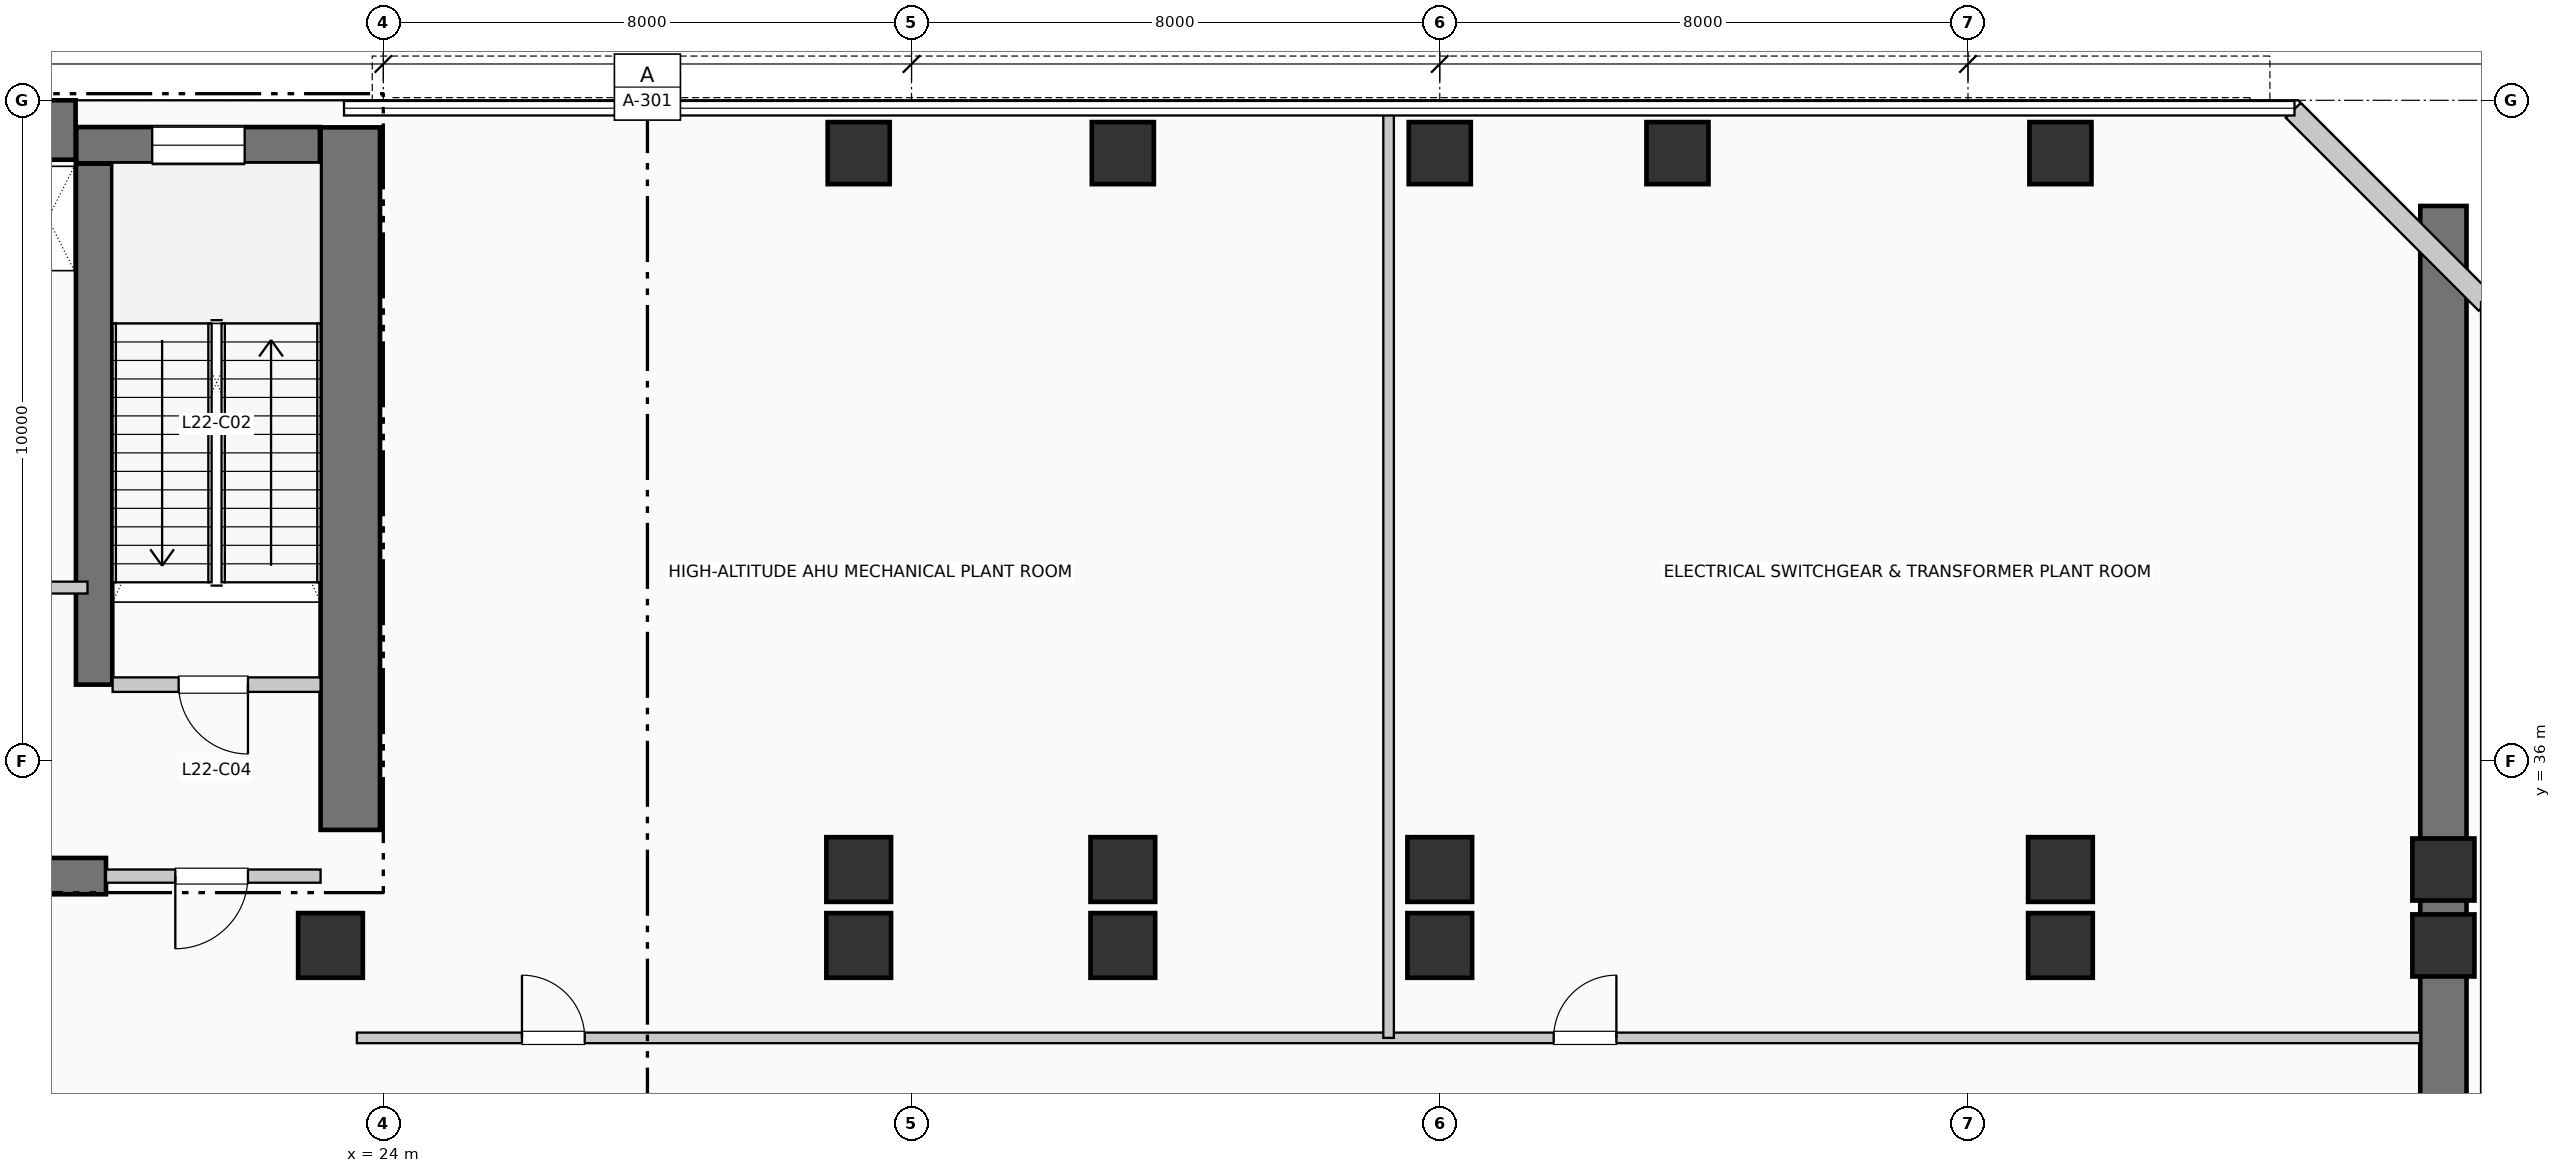
"""IFC4 building model, lengths in metres.
Left out: names, types, materials, properties, quantities, classifications, styles, units other than length and angle.
Written with IfcOpenShell. Run it as: python <this file> out.ifc"""

import sys

from ifc_helpers import new_model, si_unit, direction, frame, frame_2d, origin, origin_2d, place, context, subcontext, project, spatial, rectangle, extrude, element, fill, save


model = new_model("IFC4")
c1 = context("Model", 3, precision=1e-05, world=origin(), true_north=direction((0.0, 1.0)))
c2 = subcontext(c1, "Body", "Model", "MODEL_VIEW")
j1 = project(units=[si_unit("LENGTHUNIT", "METRE"), si_unit("PLANEANGLEUNIT", "RADIAN")], contexts=[c1])
p1 = place(None, origin())
s1 = spatial("IfcSite", under=j1, at=p1, CompositionType="ELEMENT")
p2 = place(p1, origin())
s2 = spatial("IfcBuilding", under=s1, at=p2, CompositionType="ELEMENT")
p3 = place(p2, frame((0.0, 0.0, 93.72)))
s3 = spatial("IfcBuildingStorey", under=s2, at=p3, CompositionType="ELEMENT", Elevation=93.72)
p4 = place(p3, frame((5.36, 45.55, 0.0), z_axis=(0.0, 0.0, 1.0), x_axis=(1.0, 0.0, 0.0)))
e1 = element("IfcWall", 1, at=p4, inside=s3, PredefinedType="SHEAR", context=c2, shape_type="SweptSolid", body=[
    extrude(rectangle(XDim=13.98, YDim=0.9, at=frame_2d((6.99, 0.0))), origin(), (0.0, 0.0, 1.0), 4.95),
])
p5 = place(p3, frame((23.5, 34.95, 0.0), z_axis=(0.0, 0.0, 1.0), x_axis=(0.0, 1.0, 0.0)))
e2 = element("IfcWall", 2, at=p5, inside=s3, PredefinedType="SHEAR", context=c2, shape_type="SweptSolid", body=[
    extrude(rectangle(XDim=10.64, YDim=0.9, at=frame_2d((5.32, 0.0))), origin(), (0.0, 0.0, 1.0), 4.95),
])
p6 = place(p3, frame((13.68, 34.25, 0.0), z_axis=(0.0, 0.0, 1.0), x_axis=(1.0, 0.0, 0.0)))
e3 = element("IfcWall", 3, at=p6, inside=s3, PredefinedType="SHEAR", context=c2, shape_type="SweptSolid", body=[
    extrude(rectangle(XDim=6.12, YDim=0.55, at=frame_2d((3.06, 0.0))), origin(), (0.0, 0.0, 1.0), 4.95),
])
p7 = place(p3, frame((19.62, 37.15, 0.0), z_axis=(0.0, 0.0, 1.0), x_axis=(0.0, 1.0, 0.0)))
e4 = element("IfcWall", 4, at=p7, inside=s3, PredefinedType="SHEAR", context=c2, shape_type="SweptSolid", body=[
    extrude(rectangle(XDim=7.89, YDim=0.55, at=frame_2d((3.945, 0.0))), origin(), (0.0, 0.0, 1.0), 4.95),
])
p8 = place(p3, frame((19.35, 45.32, 0.0), z_axis=(0.0, 0.0, 1.0), x_axis=(1.0, 0.0, 0.0)))
e5 = element("IfcWall", 5, at=p8, inside=s3, PredefinedType="SHEAR", context=c2, shape_type="SweptSolid", body=[
    extrude(rectangle(XDim=3.69, YDim=0.55, at=frame_2d((1.845, 0.0))), origin(), (0.0, 0.0, 1.0), 4.95),
])
p9 = place(p8, frame((1.15, 0.0, 1.05)))
e6 = element("IfcOpeningElement", 6, at=p9, cuts=e5, PredefinedType="OPENING", context=c2, shape_type="SweptSolid", body=[
    extrude(rectangle(XDim=1.4, YDim=1.8, at=frame_2d((0.7, 0.9))), frame((0.0, 0.285, 0.0), z_axis=(0.0, -1.0, 0.0), x_axis=(1.0, 0.0, 0.0)), (0.0, 0.0, 1.0), 0.57),
])
p10 = place(p3, frame((55.2, 19.5, 0.0), z_axis=(0.0, 0.0, 1.0), x_axis=(0.0, 1.0, 0.0)))
e7 = element("IfcWall", 7, at=p10, inside=s3, PredefinedType="SHEAR", context=c2, shape_type="SweptSolid", body=[
    extrude(rectangle(XDim=24.9, YDim=0.7, at=frame_2d((12.45, 0.0))), origin(), (0.0, 0.0, 1.0), 4.3),
])
for number, where, z_axis, x_axis in (
    (8, (23.2, 33.2, 0.0), (0.0, 0.0, 1.0), (1.0, 0.0, 0.0)),
    (9, (31.2, 33.2, 0.0), (0.0, 0.0, 1.0), (1.0, 0.0, 0.0)),
    (10, (31.2, 34.35, 0.0), (0.0, 0.0, 1.0), (1.0, 0.0, 0.0)),
):
    element("IfcColumn", number, at=place(p3, frame(where, z_axis=z_axis, x_axis=x_axis)), inside=s3, PredefinedType="COLUMN", context=c2, shape_type="SweptSolid", body=[
        extrude(rectangle(XDim=0.98, YDim=0.98, at=origin_2d()), origin(), (0.0, 0.0, 1.0), 4.95),
    ])
p11 = place(p3, frame((31.2, 45.2, 0.0), z_axis=(0.0, 0.0, 1.0), x_axis=(1.0, 0.0, 0.0)))
e11 = element("IfcColumn", 11, at=p11, inside=s3, PredefinedType="COLUMN", context=c2, shape_type="SweptSolid", body=[
    extrude(rectangle(XDim=0.94, YDim=0.94, at=origin_2d()), origin(), (0.0, 0.0, 1.0), 4.95),
])
for number, where, z_axis, x_axis in (
    (12, (35.2, 33.2, 0.0), (0.0, 0.0, 1.0), (1.0, 0.0, 0.0)),
    (13, (35.2, 34.35, 0.0), (0.0, 0.0, 1.0), (1.0, 0.0, 0.0)),
):
    element("IfcColumn", number, at=place(p3, frame(where, z_axis=z_axis, x_axis=x_axis)), inside=s3, PredefinedType="COLUMN", context=c2, shape_type="SweptSolid", body=[
        extrude(rectangle(XDim=0.98, YDim=0.98, at=origin_2d()), origin(), (0.0, 0.0, 1.0), 4.95),
    ])
p12 = place(p3, frame((35.2, 45.2, 0.0), z_axis=(0.0, 0.0, 1.0), x_axis=(1.0, 0.0, 0.0)))
e14 = element("IfcColumn", 14, at=p12, inside=s3, PredefinedType="COLUMN", context=c2, shape_type="SweptSolid", body=[
    extrude(rectangle(XDim=0.94, YDim=0.94, at=origin_2d()), origin(), (0.0, 0.0, 1.0), 4.95),
])
for number, where, z_axis, x_axis in (
    (15, (40.0, 33.2, 0.0), (0.0, 0.0, 1.0), (1.0, 0.0, 0.0)),
    (16, (40.0, 34.35, 0.0), (0.0, 0.0, 1.0), (1.0, 0.0, 0.0)),
):
    element("IfcColumn", number, at=place(p3, frame(where, z_axis=z_axis, x_axis=x_axis)), inside=s3, PredefinedType="COLUMN", context=c2, shape_type="SweptSolid", body=[
        extrude(rectangle(XDim=0.98, YDim=0.98, at=origin_2d()), origin(), (0.0, 0.0, 1.0), 4.95),
    ])
for number, where, z_axis, x_axis in (
    (17, (40.0, 45.2, 0.0), (0.0, 0.0, 1.0), (1.0, 0.0, 0.0)),
    (18, (43.6, 45.2, 0.0), (0.0, 0.0, 1.0), (1.0, 0.0, 0.0)),
):
    element("IfcColumn", number, at=place(p3, frame(where, z_axis=z_axis, x_axis=x_axis)), inside=s3, PredefinedType="COLUMN", context=c2, shape_type="SweptSolid", body=[
        extrude(rectangle(XDim=0.94, YDim=0.94, at=origin_2d()), origin(), (0.0, 0.0, 1.0), 4.95),
    ])
for number, where, z_axis, x_axis in (
    (19, (49.4, 33.2, 0.0), (0.0, 0.0, 1.0), (1.0, 0.0, 0.0)),
    (20, (49.4, 34.35, 0.0), (0.0, 0.0, 1.0), (1.0, 0.0, 0.0)),
):
    element("IfcColumn", number, at=place(p3, frame(where, z_axis=z_axis, x_axis=x_axis)), inside=s3, PredefinedType="COLUMN", context=c2, shape_type="SweptSolid", body=[
        extrude(rectangle(XDim=0.98, YDim=0.98, at=origin_2d()), origin(), (0.0, 0.0, 1.0), 4.95),
    ])
for number, where, z_axis, x_axis in (
    (21, (49.4, 45.2, 0.0), (0.0, 0.0, 1.0), (1.0, 0.0, 0.0)),
    (22, (55.2, 33.2, 0.0), (0.0, 0.0, 1.0), (1.0, 0.0, 0.0)),
    (23, (55.2, 34.35, 0.0), (0.0, 0.0, 1.0), (1.0, 0.0, 0.0)),
):
    element("IfcColumn", number, at=place(p3, frame(where, z_axis=z_axis, x_axis=x_axis)), inside=s3, PredefinedType="COLUMN", context=c2, shape_type="SweptSolid", body=[
        extrude(rectangle(XDim=0.94, YDim=0.94, at=origin_2d()), origin(), (0.0, 0.0, 1.0), 4.95),
    ])
p13 = place(p3, frame((55.848, 42.926, 0.0), z_axis=(0.0, 0.0, 1.0), x_axis=(-0.707106781187, 0.707106781187, 0.0)))
e24 = element("IfcWall", 24, at=p13, inside=s3, PredefinedType="SOLIDWALL", context=c2, shape_type="SweptSolid", body=[
    extrude(rectangle(XDim=4.133, YDim=0.32, at=frame_2d((2.066, 0.0))), origin(), (0.0, 0.0, 1.0), 4.7),
])
p14 = place(p3, frame((19.9, 37.15, 0.0), z_axis=(0.0, 0.0, 1.0), x_axis=(1.0, 0.0, 0.0)))
e25 = element("IfcWall", 25, at=p14, inside=s3, PredefinedType="PARTITIONING", context=c2, shape_type="SweptSolid", body=[
    extrude(rectangle(XDim=3.15, YDim=0.22, at=frame_2d((1.575, 0.0))), origin(), (0.0, 0.0, 1.0), 4.7),
])
p15 = place(p14, frame((2.05, 0.0, 0.0), z_axis=(0.0, 0.0, 1.0), x_axis=(-1.0, 0.0, 0.0)))
e26 = element("IfcOpeningElement", 26, at=p15, cuts=e25, PredefinedType="OPENING", context=c2, shape_type="SweptSolid", body=[
    extrude(rectangle(XDim=1.05, YDim=2.15, at=frame_2d((0.525, 1.075))), frame((0.0, 0.12, 0.0), z_axis=(0.0, -1.0, 0.0), x_axis=(1.0, 0.0, 0.0)), (0.0, 0.0, 1.0), 0.24),
])
p16 = place(p3, frame((19.8, 34.25, 0.0), z_axis=(0.0, 0.0, 1.0), x_axis=(1.0, 0.0, 0.0)))
e27 = element("IfcWall", 27, at=p16, inside=s3, PredefinedType="PARTITIONING", context=c2, shape_type="SweptSolid", body=[
    extrude(rectangle(XDim=3.25, YDim=0.2, at=frame_2d((1.625, 0.0))), origin(), (0.0, 0.0, 1.0), 4.7),
])
p17 = place(p16, frame((2.15, 0.0, 0.0), z_axis=(0.0, 0.0, 1.0), x_axis=(-1.0, 0.0, 0.0)))
e28 = element("IfcOpeningElement", 28, at=p17, cuts=e27, PredefinedType="OPENING", context=c2, shape_type="SweptSolid", body=[
    extrude(rectangle(XDim=1.1, YDim=2.15, at=frame_2d((0.55, 1.075))), frame((0.0, 0.11, 0.0), z_axis=(0.0, -1.0, 0.0), x_axis=(1.0, 0.0, 0.0)), (0.0, 0.0, 1.0), 0.22),
])
p18 = place(p3, frame((17.68, 38.62, 0.0), z_axis=(0.0, 0.0, 1.0), x_axis=(1.0, 0.0, 0.0)))
e29 = element("IfcWall", 29, at=p18, inside=s3, PredefinedType="PARTITIONING", context=c2, shape_type="SweptSolid", body=[
    extrude(rectangle(XDim=1.84, YDim=0.18, at=frame_2d((0.92, 0.0))), origin(), (0.0, 0.0, 1.0), 4.7),
])
p19 = place(p18, frame((0.24, 0.0, 0.0)))
e30 = element("IfcOpeningElement", 30, at=p19, cuts=e29, PredefinedType="OPENING", context=c2, shape_type="SweptSolid", body=[
    extrude(rectangle(XDim=0.92, YDim=2.1, at=frame_2d((0.46, 1.05))), frame((0.0, 0.1, 0.0), z_axis=(0.0, -1.0, 0.0), x_axis=(1.0, 0.0, 0.0)), (0.0, 0.0, 1.0), 0.2),
])
p20 = place(p3, frame((23.6, 31.8, 0.0), z_axis=(0.0, 0.0, 1.0), x_axis=(1.0, 0.0, 0.0)))
e31 = element("IfcWall", 31, at=p20, inside=s3, PredefinedType="PARTITIONING", context=c2, shape_type="SweptSolid", body=[
    extrude(rectangle(XDim=31.25, YDim=0.16, at=frame_2d((15.625, 0.0))), origin(), (0.0, 0.0, 1.0), 4.7),
])
p21 = place(p20, frame((2.5, 0.0, 0.0)))
e32 = element("IfcOpeningElement", 32, at=p21, cuts=e31, PredefinedType="OPENING", context=c2, shape_type="SweptSolid", body=[
    extrude(rectangle(XDim=0.95, YDim=2.1, at=frame_2d((0.475, 1.05))), frame((0.0, 0.09, 0.0), z_axis=(0.0, -1.0, 0.0), x_axis=(1.0, 0.0, 0.0)), (0.0, 0.0, 1.0), 0.18),
])
p22 = place(p20, frame((18.125, 0.0, 0.0)))
e33 = element("IfcOpeningElement", 33, at=p22, cuts=e31, PredefinedType="OPENING", context=c2, shape_type="SweptSolid", body=[
    extrude(rectangle(XDim=0.95, YDim=2.1, at=frame_2d((0.475, 1.05))), frame((0.0, 0.09, 0.0), z_axis=(0.0, -1.0, 0.0), x_axis=(1.0, 0.0, 0.0)), (0.0, 0.0, 1.0), 0.18),
])
p23 = place(p3, frame((39.225, 31.8, 0.0), z_axis=(0.0, 0.0, 1.0), x_axis=(0.0, 1.0, 0.0)))
e34 = element("IfcWall", 34, at=p23, inside=s3, PredefinedType="PARTITIONING", context=c2, shape_type="SweptSolid", body=[
    extrude(rectangle(XDim=14.01, YDim=0.16, at=frame_2d((7.005, 0.0))), origin(), (0.0, 0.0, 1.0), 4.7),
])
p24 = place(p9, origin())
e35 = element("IfcWindow", 35, at=p24, inside=s3, PartitioningType="SINGLE_PANEL", PredefinedType="WINDOW", context=c2, shape_type="SweptSolid", body=[
    extrude(rectangle(XDim=1.4, YDim=1.8, at=frame_2d((0.7, 0.9))), frame((0.0, 0.03, 0.0), z_axis=(0.0, -1.0, 0.0), x_axis=(1.0, 0.0, 0.0)), (0.0, 0.0, 1.0), 0.06),
])
fill(e6, e35)
p25 = place(p15, origin())
e36 = element("IfcDoor", 36, at=p25, inside=s3, OperationType="SINGLE_SWING_RIGHT", PredefinedType="DOOR", context=c2, shape_type="SweptSolid", body=[
    extrude(rectangle(XDim=1.05, YDim=2.15, at=frame_2d((0.525, 1.075))), frame((0.0, 0.025, 0.0), z_axis=(0.0, -1.0, 0.0), x_axis=(1.0, 0.0, 0.0)), (0.0, 0.0, 1.0), 0.05),
])
fill(e26, e36)
p26 = place(p17, origin())
e37 = element("IfcDoor", 37, at=p26, inside=s3, OperationType="SINGLE_SWING_LEFT", PredefinedType="DOOR", context=c2, shape_type="SweptSolid", body=[
    extrude(rectangle(XDim=1.1, YDim=2.15, at=frame_2d((0.55, 1.075))), frame((0.0, 0.025, 0.0), z_axis=(0.0, -1.0, 0.0), x_axis=(1.0, 0.0, 0.0)), (0.0, 0.0, 1.0), 0.05),
])
fill(e28, e37)
p27 = place(p21, origin())
e38 = element("IfcDoor", 38, at=p27, inside=s3, OperationType="SINGLE_SWING_LEFT", PredefinedType="DOOR", context=c2, shape_type="SweptSolid", body=[
    extrude(rectangle(XDim=0.95, YDim=2.1, at=frame_2d((0.475, 1.05))), frame((0.0, 0.025, 0.0), z_axis=(0.0, -1.0, 0.0), x_axis=(1.0, 0.0, 0.0)), (0.0, 0.0, 1.0), 0.05),
])
fill(e32, e38)
p28 = place(p22, origin())
e39 = element("IfcDoor", 39, at=p28, inside=s3, OperationType="SINGLE_SWING_RIGHT", PredefinedType="DOOR", context=c2, shape_type="SweptSolid", body=[
    extrude(rectangle(XDim=0.95, YDim=2.1, at=frame_2d((0.475, 1.05))), frame((0.0, 0.025, 0.0), z_axis=(0.0, -1.0, 0.0), x_axis=(1.0, 0.0, 0.0)), (0.0, 0.0, 1.0), 0.05),
])
fill(e33, e39)
save(model, sys.argv[1])
